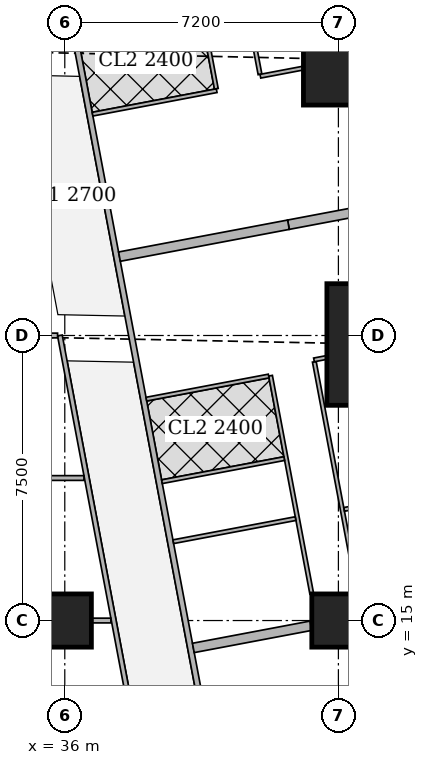
"""IFC4 building model, lengths in metres.
Left out: names, types, materials, properties, quantities, classifications, styles, units other than length and angle.
Written with IfcOpenShell. Run it as: python <this file> out.ifc"""

import sys

from ifc_helpers import new_model, si_unit, direction, frame, frame_2d, origin, origin_2d, place, context, subcontext, project, spatial, rectangle, extrude, element, fill, save


model = new_model("IFC4")
c1 = context("Model", 3, precision=1e-05, world=origin(), true_north=direction((0.0, 1.0)))
c2 = subcontext(c1, "Body", "Model", "MODEL_VIEW")
j1 = project(units=[si_unit("LENGTHUNIT", "METRE"), si_unit("PLANEANGLEUNIT", "RADIAN")], contexts=[c1])
p1 = place(None, origin())
s1 = spatial("IfcSite", under=j1, at=p1, CompositionType="ELEMENT")
p2 = place(p1, origin())
s2 = spatial("IfcBuilding", under=s1, at=p2, CompositionType="ELEMENT")
p3 = place(p2, frame((0.0, 0.0, 193.7)))
s3 = spatial("IfcBuildingStorey", under=s2, at=p3, CompositionType="ELEMENT", Elevation=193.7)
for number, where, z_axis, x_axis in (
    (1, (36.0, 15.0, 0.0), (0.0, 0.0, 1.0), (1.0, 0.0, 0.0)),
    (2, (43.2, 15.0, 0.0), (0.0, 0.0, 1.0), (1.0, 0.0, 0.0)),
):
    element("IfcColumn", number, at=place(p3, frame(where, z_axis=z_axis, x_axis=x_axis)), inside=s3, PredefinedType="COLUMN", context=c2, shape_type="SweptSolid", body=[
        extrude(rectangle(XDim=1.4, YDim=1.4, at=origin_2d()), origin(), (0.0, 0.0, 1.0), 3.75),
    ])
p4 = place(p3, frame((44.697, 22.263, 0.0), z_axis=(0.0, 0.0, 1.0), x_axis=(1.0, 0.0, 0.0)))
e3 = element("IfcColumn", 3, at=p4, inside=s3, PredefinedType="COLUMN", context=c2, shape_type="SweptSolid", body=[
    extrude(rectangle(XDim=3.6, YDim=3.2, at=origin_2d()), origin(), (0.0, 0.0, 1.0), 3.75),
])
p5 = place(p3, frame((43.48, 29.763, 0.0), z_axis=(0.0, 0.0, 1.0), x_axis=(1.0, 0.0, 0.0)))
e4 = element("IfcColumn", 4, at=p5, inside=s3, PredefinedType="COLUMN", context=c2, shape_type="SweptSolid", body=[
    extrude(rectangle(XDim=2.4, YDim=2.4, at=origin_2d()), origin(), (0.0, 0.0, 1.0), 3.75),
])
p6 = place(p3, frame((50.653, 2.703, 0.0), z_axis=(0.0, 0.0, 1.0), x_axis=(-0.185612026696, 0.982623109613, 0.0)))
e5 = element("IfcWall", 5, at=p6, inside=s3, PredefinedType="SOLIDWALL", context=c2, shape_type="SweptSolid", body=[
    extrude(rectangle(XDim=41.393, YDim=0.2, at=frame_2d((20.697, 0.0))), origin(), (0.0, 0.0, 1.0), 3.5),
])
p7 = place(p6, frame((1.633, 0.0, 0.9)))
e6 = element("IfcOpeningElement", 6, at=p7, cuts=e5, PredefinedType="OPENING", context=c2, shape_type="SweptSolid", body=[
    extrude(rectangle(XDim=1.8, YDim=1.5, at=frame_2d((0.9, 0.75))), frame((0.0, 0.11, 0.0), z_axis=(0.0, -1.0, 0.0), x_axis=(1.0, 0.0, 0.0)), (0.0, 0.0, 1.0), 0.22),
])
p8 = place(p6, frame((6.032, 0.0, 0.9)))
e7 = element("IfcOpeningElement", 7, at=p8, cuts=e5, PredefinedType="OPENING", context=c2, shape_type="SweptSolid", body=[
    extrude(rectangle(XDim=1.8, YDim=1.5, at=frame_2d((0.9, 0.75))), frame((0.0, 0.11, 0.0), z_axis=(0.0, -1.0, 0.0), x_axis=(1.0, 0.0, 0.0)), (0.0, 0.0, 1.0), 0.22),
])
p9 = place(p6, frame((9.848, 0.0, 0.9)))
e8 = element("IfcOpeningElement", 8, at=p9, cuts=e5, PredefinedType="OPENING", context=c2, shape_type="SweptSolid", body=[
    extrude(rectangle(XDim=1.8, YDim=1.5, at=frame_2d((0.9, 0.75))), frame((0.0, 0.11, 0.0), z_axis=(0.0, -1.0, 0.0), x_axis=(1.0, 0.0, 0.0)), (0.0, 0.0, 1.0), 0.22),
])
p10 = place(p6, frame((13.664, 0.0, 0.9)))
e9 = element("IfcOpeningElement", 9, at=p10, cuts=e5, PredefinedType="OPENING", context=c2, shape_type="SweptSolid", body=[
    extrude(rectangle(XDim=1.8, YDim=1.5, at=frame_2d((0.9, 0.75))), frame((0.0, 0.11, 0.0), z_axis=(0.0, -1.0, 0.0), x_axis=(1.0, 0.0, 0.0)), (0.0, 0.0, 1.0), 0.22),
])
p11 = place(p6, frame((17.481, 0.0, 0.9)))
e10 = element("IfcOpeningElement", 10, at=p11, cuts=e5, PredefinedType="OPENING", context=c2, shape_type="SweptSolid", body=[
    extrude(rectangle(XDim=1.8, YDim=1.5, at=frame_2d((0.9, 0.75))), frame((0.0, 0.11, 0.0), z_axis=(0.0, -1.0, 0.0), x_axis=(1.0, 0.0, 0.0)), (0.0, 0.0, 1.0), 0.22),
])
p12 = place(p6, frame((21.297, 0.0, 0.9)))
e11 = element("IfcOpeningElement", 11, at=p12, cuts=e5, PredefinedType="OPENING", context=c2, shape_type="SweptSolid", body=[
    extrude(rectangle(XDim=1.8, YDim=1.5, at=frame_2d((0.9, 0.75))), frame((0.0, 0.11, 0.0), z_axis=(0.0, -1.0, 0.0), x_axis=(1.0, 0.0, 0.0)), (0.0, 0.0, 1.0), 0.22),
])
p13 = place(p6, frame((25.113, 0.0, 0.9)))
e12 = element("IfcOpeningElement", 12, at=p13, cuts=e5, PredefinedType="OPENING", context=c2, shape_type="SweptSolid", body=[
    extrude(rectangle(XDim=1.8, YDim=1.5, at=frame_2d((0.9, 0.75))), frame((0.0, 0.11, 0.0), z_axis=(0.0, -1.0, 0.0), x_axis=(1.0, 0.0, 0.0)), (0.0, 0.0, 1.0), 0.22),
])
p14 = place(p6, frame((28.93, 0.0, 0.9)))
e13 = element("IfcOpeningElement", 13, at=p14, cuts=e5, PredefinedType="OPENING", context=c2, shape_type="SweptSolid", body=[
    extrude(rectangle(XDim=1.8, YDim=1.5, at=frame_2d((0.9, 0.75))), frame((0.0, 0.11, 0.0), z_axis=(0.0, -1.0, 0.0), x_axis=(1.0, 0.0, 0.0)), (0.0, 0.0, 1.0), 0.22),
])
p15 = place(p6, frame((32.746, 0.0, 0.9)))
e14 = element("IfcOpeningElement", 14, at=p15, cuts=e5, PredefinedType="OPENING", context=c2, shape_type="SweptSolid", body=[
    extrude(rectangle(XDim=1.8, YDim=1.5, at=frame_2d((0.9, 0.75))), frame((0.0, 0.11, 0.0), z_axis=(0.0, -1.0, 0.0), x_axis=(1.0, 0.0, 0.0)), (0.0, 0.0, 1.0), 0.22),
])
p16 = place(p6, frame((36.481, 0.0, 0.9)))
e15 = element("IfcOpeningElement", 15, at=p16, cuts=e5, PredefinedType="OPENING", context=c2, shape_type="SweptSolid", body=[
    extrude(rectangle(XDim=1.8, YDim=1.5, at=frame_2d((0.9, 0.75))), frame((0.0, 0.11, 0.0), z_axis=(0.0, -1.0, 0.0), x_axis=(1.0, 0.0, 0.0)), (0.0, 0.0, 1.0), 0.22),
])
p17 = place(p3, frame((33.933, 42.73, 0.0), z_axis=(0.0, 0.0, 1.0), x_axis=(0.185595417643, -0.982626246825, 0.0)))
e16 = element("IfcWall", 16, at=p17, inside=s3, PredefinedType="SOLIDWALL", context=c2, shape_type="SweptSolid", body=[
    extrude(rectangle(XDim=41.051, YDim=0.15, at=frame_2d((20.525, 0.0))), origin(), (0.0, 0.0, 1.0), 2.5),
])
p18 = place(p17, frame((16.082, 0.0, 0.0)))
e17 = element("IfcOpeningElement", 17, at=p18, cuts=e16, PredefinedType="OPENING", context=c2, shape_type="SweptSolid", body=[
    extrude(rectangle(XDim=1.0, YDim=2.1, at=frame_2d((0.5, 1.05))), frame((0.0, 0.085, 0.0), z_axis=(0.0, -1.0, 0.0), x_axis=(1.0, 0.0, 0.0)), (0.0, 0.0, 1.0), 0.17),
])
p19 = place(p17, frame((19.898, 0.0, 0.0)))
e18 = element("IfcOpeningElement", 18, at=p19, cuts=e16, PredefinedType="OPENING", context=c2, shape_type="SweptSolid", body=[
    extrude(rectangle(XDim=1.0, YDim=2.1, at=frame_2d((0.5, 1.05))), frame((0.0, 0.085, 0.0), z_axis=(0.0, -1.0, 0.0), x_axis=(1.0, 0.0, 0.0)), (0.0, 0.0, 1.0), 0.17),
])
p20 = place(p17, frame((30.862, 0.0, 0.0)))
e19 = element("IfcOpeningElement", 19, at=p20, cuts=e16, PredefinedType="OPENING", context=c2, shape_type="SweptSolid", body=[
    extrude(rectangle(XDim=1.0, YDim=2.1, at=frame_2d((0.5, 1.05))), frame((0.0, 0.085, 0.0), z_axis=(0.0, -1.0, 0.0), x_axis=(1.0, 0.0, 0.0)), (0.0, 0.0, 1.0), 0.17),
])
p21 = place(p3, frame((38.764, 41.941, 0.0), z_axis=(0.0, 0.0, 1.0), x_axis=(0.185512176227, -0.982641965556, 0.0)))
e20 = element("IfcWall", 20, at=p21, inside=s3, PredefinedType="PARTITIONING", context=c2, shape_type="SweptSolid", body=[
    extrude(rectangle(XDim=12.792, YDim=0.1, at=frame_2d((6.396, 0.0))), origin(), (0.0, 0.0, 1.0), 2.5),
])
p22 = place(p21, frame((11.35, 0.0, 0.0)))
e21 = element("IfcOpeningElement", 21, at=p22, cuts=e20, PredefinedType="OPENING", context=c2, shape_type="SweptSolid", body=[
    extrude(rectangle(XDim=0.9, YDim=2.1, at=frame_2d((0.45, 1.05))), frame((0.0, 0.06, 0.0), z_axis=(0.0, -1.0, 0.0), x_axis=(1.0, 0.0, 0.0)), (0.0, 0.0, 1.0), 0.12),
])
p23 = place(p21, frame((8.085, 0.0, 0.0)))
e22 = element("IfcOpeningElement", 22, at=p23, cuts=e20, PredefinedType="OPENING", context=c2, shape_type="SweptSolid", body=[
    extrude(rectangle(XDim=0.9, YDim=2.1, at=frame_2d((0.45, 1.05))), frame((0.0, 0.06, 0.0), z_axis=(0.0, -1.0, 0.0), x_axis=(1.0, 0.0, 0.0)), (0.0, 0.0, 1.0), 0.12),
])
p24 = place(p21, frame((3.7, 0.0, 0.0)))
e23 = element("IfcOpeningElement", 23, at=p24, cuts=e20, PredefinedType="OPENING", context=c2, shape_type="SweptSolid", body=[
    extrude(rectangle(XDim=0.9, YDim=2.1, at=frame_2d((0.45, 1.05))), frame((0.0, 0.06, 0.0), z_axis=(0.0, -1.0, 0.0), x_axis=(1.0, 0.0, 0.0)), (0.0, 0.0, 1.0), 0.12),
])
p25 = place(p3, frame((37.473, 42.309, 0.0), z_axis=(0.0, 0.0, 1.0), x_axis=(0.185570636839, -0.982630927024, 0.0)))
e24 = element("IfcWall", 24, at=p25, inside=s3, PredefinedType="PARTITIONING", context=c2, shape_type="SweptSolid", body=[
    extrude(rectangle(XDim=13.553, YDim=0.1, at=frame_2d((6.777, 0.0))), origin(), (0.0, 0.0, 1.0), 2.5),
])
p26 = place(p25, frame((12.049, 0.0, 0.0)))
e25 = element("IfcOpeningElement", 25, at=p26, cuts=e24, PredefinedType="OPENING", context=c2, shape_type="SweptSolid", body=[
    extrude(rectangle(XDim=0.9, YDim=2.1, at=frame_2d((0.45, 1.05))), frame((0.0, 0.06, 0.0), z_axis=(0.0, -1.0, 0.0), x_axis=(1.0, 0.0, 0.0)), (0.0, 0.0, 1.0), 0.12),
])
p27 = place(p25, frame((8.427, 0.0, 0.0)))
e26 = element("IfcOpeningElement", 26, at=p27, cuts=e24, PredefinedType="OPENING", context=c2, shape_type="SweptSolid", body=[
    extrude(rectangle(XDim=0.9, YDim=2.1, at=frame_2d((0.45, 1.05))), frame((0.0, 0.06, 0.0), z_axis=(0.0, -1.0, 0.0), x_axis=(1.0, 0.0, 0.0)), (0.0, 0.0, 1.0), 0.12),
])
p28 = place(p25, frame((2.853, 0.0, 0.0)))
e27 = element("IfcOpeningElement", 27, at=p28, cuts=e24, PredefinedType="OPENING", context=c2, shape_type="SweptSolid", body=[
    extrude(rectangle(XDim=0.9, YDim=2.1, at=frame_2d((0.45, 1.05))), frame((0.0, 0.06, 0.0), z_axis=(0.0, -1.0, 0.0), x_axis=(1.0, 0.0, 0.0)), (0.0, 0.0, 1.0), 0.12),
])
p29 = place(p25, frame((10.14, 0.0, 0.0)))
e28 = element("IfcOpeningElement", 28, at=p29, cuts=e24, PredefinedType="OPENING", context=c2, shape_type="SweptSolid", body=[
    extrude(rectangle(XDim=0.9, YDim=2.1, at=frame_2d((0.45, 1.05))), frame((0.0, 0.06, 0.0), z_axis=(0.0, -1.0, 0.0), x_axis=(1.0, 0.0, 0.0)), (0.0, 0.0, 1.0), 0.12),
])
p30 = place(p25, frame((5.759, 0.0, 0.0)))
e29 = element("IfcOpeningElement", 29, at=p30, cuts=e24, PredefinedType="OPENING", context=c2, shape_type="SweptSolid", body=[
    extrude(rectangle(XDim=0.9, YDim=2.1, at=frame_2d((0.45, 1.05))), frame((0.0, 0.06, 0.0), z_axis=(0.0, -1.0, 0.0), x_axis=(1.0, 0.0, 0.0)), (0.0, 0.0, 1.0), 0.12),
])
p31 = place(p3, frame((42.27, 29.535, 0.0), z_axis=(0.0, 0.0, 1.0), x_axis=(-0.982502700549, -0.186248338017, 0.0)))
e30 = element("IfcWall", 30, at=p31, inside=s3, PredefinedType="PARTITIONING", context=c2, shape_type="SweptSolid", body=[
    extrude(rectangle(XDim=1.143, YDim=0.1, at=frame_2d((0.572, 0.0))), origin(), (0.0, 0.0, 1.0), 2.5),
])
p32 = place(p3, frame((39.997, 28.942, 0.0), z_axis=(0.0, 0.0, 1.0), x_axis=(-0.982569883123, -0.185893584556, 0.0)))
e31 = element("IfcWall", 31, at=p32, inside=s3, PredefinedType="PARTITIONING", context=c2, shape_type="SweptSolid", body=[
    extrude(rectangle(XDim=3.324, YDim=0.1, at=frame_2d((1.662, 0.0))), origin(), (0.0, 0.0, 1.0), 3.5),
])
p33 = place(p3, frame((42.566, 21.809, 0.0), z_axis=(0.0, 0.0, 1.0), x_axis=(0.185613526435, -0.98262282632, 0.0)))
e32 = element("IfcWall", 32, at=p33, inside=s3, PredefinedType="PARTITIONING", context=c2, shape_type="SweptSolid", body=[
    extrude(rectangle(XDim=6.207, YDim=0.1, at=frame_2d((3.104, 0.0))), origin(), (0.0, 0.0, 1.0), 2.5),
])
p34 = place(p33, frame((1.45, 0.0, 0.0)))
e33 = element("IfcOpeningElement", 33, at=p34, cuts=e32, PredefinedType="OPENING", context=c2, shape_type="SweptSolid", body=[
    extrude(rectangle(XDim=0.9, YDim=2.1, at=frame_2d((0.45, 1.05))), frame((0.0, 0.06, 0.0), z_axis=(0.0, -1.0, 0.0), x_axis=(1.0, 0.0, 0.0)), (0.0, 0.0, 1.0), 0.12),
])
p35 = place(p33, frame((4.163, 0.0, 0.0)))
e34 = element("IfcOpeningElement", 34, at=p35, cuts=e32, PredefinedType="OPENING", context=c2, shape_type="SweptSolid", body=[
    extrude(rectangle(XDim=0.9, YDim=2.1, at=frame_2d((0.45, 1.05))), frame((0.0, 0.06, 0.0), z_axis=(0.0, -1.0, 0.0), x_axis=(1.0, 0.0, 0.0)), (0.0, 0.0, 1.0), 0.12),
])
p36 = place(p3, frame((41.414, 21.442, 0.0), z_axis=(0.0, 0.0, 1.0), x_axis=(0.185698675093, -0.982606738257, 0.0)))
e35 = element("IfcWall", 35, at=p36, inside=s3, PredefinedType="PARTITIONING", context=c2, shape_type="SweptSolid", body=[
    extrude(rectangle(XDim=5.843, YDim=0.1, at=frame_2d((2.921, 0.0))), origin(), (0.0, 0.0, 1.0), 3.5),
])
p37 = place(p36, frame((0.655, 0.0, 0.0)))
e36 = element("IfcOpeningElement", 36, at=p37, cuts=e35, PredefinedType="OPENING", context=c2, shape_type="SweptSolid", body=[
    extrude(rectangle(XDim=0.9, YDim=2.1, at=frame_2d((0.45, 1.05))), frame((0.0, 0.06, 0.0), z_axis=(0.0, -1.0, 0.0), x_axis=(1.0, 0.0, 0.0)), (0.0, 0.0, 1.0), 0.12),
])
p38 = place(p36, frame((2.563, 0.0, 0.0)))
e37 = element("IfcOpeningElement", 37, at=p38, cuts=e35, PredefinedType="OPENING", context=c2, shape_type="SweptSolid", body=[
    extrude(rectangle(XDim=0.9, YDim=2.1, at=frame_2d((0.45, 1.05))), frame((0.0, 0.06, 0.0), z_axis=(0.0, -1.0, 0.0), x_axis=(1.0, 0.0, 0.0)), (0.0, 0.0, 1.0), 0.12),
])
p39 = place(p3, frame((42.887, 21.921, 0.0), z_axis=(0.0, 0.0, 1.0), x_axis=(-0.982274918032, -0.187445953293, 0.0)))
e38 = element("IfcWall", 38, at=p39, inside=s3, PredefinedType="PARTITIONING", context=c2, shape_type="SweptSolid", body=[
    extrude(rectangle(XDim=0.336, YDim=0.1, at=frame_2d((0.168, 0.0))), origin(), (0.0, 0.0, 1.0), 2.5),
])
p40 = place(p3, frame((47.527, 18.712, 0.0), z_axis=(0.0, 0.0, 1.0), x_axis=(-0.982665405803, -0.185387972203, 0.0)))
e39 = element("IfcWall", 39, at=p40, inside=s3, PredefinedType="PARTITIONING", context=c2, shape_type="SweptSolid", body=[
    extrude(rectangle(XDim=4.25, YDim=0.1, at=frame_2d((2.125, 0.0))), origin(), (0.0, 0.0, 1.0), 2.05),
])
p41 = place(p3, frame((41.365, 21.433, 0.0), z_axis=(0.0, 0.0, 1.0), x_axis=(-0.982607026909, -0.185697147715, 0.0)))
e40 = element("IfcWall", 40, at=p41, inside=s3, PredefinedType="PARTITIONING", context=c2, shape_type="SweptSolid", body=[
    extrude(rectangle(XDim=3.275, YDim=0.1, at=frame_2d((1.637, 0.0))), origin(), (0.0, 0.0, 1.0), 3.5),
])
p42 = place(p3, frame((42.073, 17.682, 0.0), z_axis=(0.0, 0.0, 1.0), x_axis=(-0.982620626894, -0.185625169636, 0.0)))
e41 = element("IfcWall", 41, at=p42, inside=s3, PredefinedType="PARTITIONING", context=c2, shape_type="SweptSolid", body=[
    extrude(rectangle(XDim=3.275, YDim=0.1, at=frame_2d((1.637, 0.0))), origin(), (0.0, 0.0, 1.0), 3.5),
])
p43 = place(p42, frame((1.2, 0.0, 0.0)))
e42 = element("IfcOpeningElement", 42, at=p43, cuts=e41, PredefinedType="OPENING", context=c2, shape_type="SweptSolid", body=[
    extrude(rectangle(XDim=0.9, YDim=2.1, at=frame_2d((0.45, 1.05))), frame((0.0, 0.06, 0.0), z_axis=(0.0, -1.0, 0.0), x_axis=(1.0, 0.0, 0.0)), (0.0, 0.0, 1.0), 0.12),
])
p44 = place(p3, frame((41.775, 19.261, 0.0), z_axis=(0.0, 0.0, 1.0), x_axis=(-0.982620626894, -0.185625169636, 0.0)))
e43 = element("IfcWall", 43, at=p44, inside=s3, PredefinedType="PARTITIONING", context=c2, shape_type="SweptSolid", body=[
    extrude(rectangle(XDim=3.275, YDim=0.1, at=frame_2d((1.637, 0.0))), origin(), (0.0, 0.0, 1.0), 3.5),
])
p45 = place(p3, frame((46.11, 26.213, 0.0), z_axis=(0.0, 0.0, 1.0), x_axis=(-0.982633535512, -0.185556823879, 0.0)))
e44 = element("IfcWall", 44, at=p45, inside=s3, PredefinedType="SOLIDWALL", context=c2, shape_type="SweptSolid", body=[
    extrude(rectangle(XDim=4.3, YDim=0.25, at=frame_2d((2.15, 0.0))), origin(), (0.0, 0.0, 1.0), 2.05),
])
p46 = place(p3, frame((41.885, 25.415, 0.0), z_axis=(0.0, 0.0, 1.0), x_axis=(-0.982612837616, -0.185666398014, 0.0)))
e45 = element("IfcWall", 45, at=p46, inside=s3, PredefinedType="SOLIDWALL", context=c2, shape_type="SweptSolid", body=[
    extrude(rectangle(XDim=4.525, YDim=0.25, at=frame_2d((2.262, 0.0))), origin(), (0.0, 0.0, 1.0), 3.5),
])
p47 = place(p3, frame((42.476, 14.863, 0.0), z_axis=(0.0, 0.0, 1.0), x_axis=(-0.982638716117, -0.185529387398, 0.0)))
e46 = element("IfcWall", 46, at=p47, inside=s3, PredefinedType="SOLIDWALL", context=c2, shape_type="SweptSolid", body=[
    extrude(rectangle(XDim=3.148, YDim=0.25, at=frame_2d((1.574, 0.0))), origin(), (0.0, 0.0, 1.0), 3.5),
])
p48 = place(p3, frame((38.202, 10.163, 0.0), z_axis=(0.0, 0.0, 1.0), x_axis=(-0.185645577403, 0.982616771479, 0.0)))
e47 = element("IfcWall", 47, at=p48, inside=s3, PredefinedType="PARTITIONING", context=c2, shape_type="SweptSolid", body=[
    extrude(rectangle(XDim=12.555, YDim=0.125, at=frame_2d((6.278, 0.0))), origin(), (0.0, 0.0, 1.0), 2.5),
])
p49 = place(p48, frame((0.708, 0.0, 0.0)))
e48 = element("IfcOpeningElement", 48, at=p49, cuts=e47, PredefinedType="OPENING", context=c2, shape_type="SweptSolid", body=[
    extrude(rectangle(XDim=1.0, YDim=2.1, at=frame_2d((0.5, 1.05))), frame((0.0, 0.073, 0.0), z_axis=(0.0, -1.0, 0.0), x_axis=(1.0, 0.0, 0.0)), (0.0, 0.0, 1.0), 0.145),
])
p50 = place(p48, frame((5.9, 0.0, 0.0)))
e49 = element("IfcOpeningElement", 49, at=p50, cuts=e47, PredefinedType="OPENING", context=c2, shape_type="SweptSolid", body=[
    extrude(rectangle(XDim=1.0, YDim=2.1, at=frame_2d((0.5, 1.05))), frame((0.0, 0.073, 0.0), z_axis=(0.0, -1.0, 0.0), x_axis=(1.0, 0.0, 0.0)), (0.0, 0.0, 1.0), 0.145),
])
p51 = place(p48, frame((9.562, 0.0, 0.0)))
e50 = element("IfcOpeningElement", 50, at=p51, cuts=e47, PredefinedType="OPENING", context=c2, shape_type="SweptSolid", body=[
    extrude(rectangle(XDim=1.0, YDim=2.1, at=frame_2d((0.5, 1.05))), frame((0.0, 0.073, 0.0), z_axis=(0.0, -1.0, 0.0), x_axis=(1.0, 0.0, 0.0)), (0.0, 0.0, 1.0), 0.145),
])
p52 = place(p3, frame((36.701, 15.0, 0.0), z_axis=(0.0, 0.0, 1.0), x_axis=(1.0, 0.0, 0.0)))
e51 = element("IfcWall", 51, at=p52, inside=s3, PredefinedType="PARTITIONING", context=c2, shape_type="SweptSolid", body=[
    extrude(rectangle(XDim=0.512, YDim=0.125, at=frame_2d((0.256, 0.0))), origin(), (0.0, 0.0, 1.0), 3.5),
])
p53 = place(p3, frame((29.25, 18.75, 0.0), z_axis=(0.0, 0.0, 1.0), x_axis=(1.0, 0.0, 0.0)))
e52 = element("IfcWall", 52, at=p53, inside=s3, PredefinedType="PARTITIONING", context=c2, shape_type="SweptSolid", body=[
    extrude(rectangle(XDim=7.254, YDim=0.125, at=frame_2d((3.627, 0.0))), origin(), (0.0, 0.0, 1.0), 3.5),
])
p54 = place(p3, frame((33.701, 22.5, 0.0), z_axis=(0.0, 0.0, 1.0), x_axis=(1.0, 0.0, 0.0)))
e53 = element("IfcWall", 53, at=p54, inside=s3, PredefinedType="PARTITIONING", context=c2, shape_type="SweptSolid", body=[
    extrude(rectangle(XDim=2.109, YDim=0.125, at=frame_2d((1.055, 0.0))), origin(), (0.0, 0.0, 1.0), 2.5),
])
p55 = place(p22, origin())
e54 = element("IfcDoor", 54, at=p55, inside=s3, OperationType="SINGLE_SWING_RIGHT", PredefinedType="DOOR", context=c2, shape_type="SweptSolid", body=[
    extrude(rectangle(XDim=0.9, YDim=2.1, at=frame_2d((0.45, 1.05))), frame((0.0, 0.025, 0.0), z_axis=(0.0, -1.0, 0.0), x_axis=(1.0, 0.0, 0.0)), (0.0, 0.0, 1.0), 0.05),
])
fill(e21, e54)
p56 = place(p26, origin())
e55 = element("IfcDoor", 55, at=p56, inside=s3, OperationType="SINGLE_SWING_LEFT", PredefinedType="DOOR", context=c2, shape_type="SweptSolid", body=[
    extrude(rectangle(XDim=0.9, YDim=2.1, at=frame_2d((0.45, 1.05))), frame((0.0, 0.025, 0.0), z_axis=(0.0, -1.0, 0.0), x_axis=(1.0, 0.0, 0.0)), (0.0, 0.0, 1.0), 0.05),
])
fill(e25, e55)
p57 = place(p18, origin())
e56 = element("IfcDoor", 56, at=p57, inside=s3, OperationType="SINGLE_SWING_LEFT", PredefinedType="DOOR", context=c2, shape_type="SweptSolid", body=[
    extrude(rectangle(XDim=1.0, YDim=2.1, at=frame_2d((0.5, 1.05))), frame((0.0, 0.025, 0.0), z_axis=(0.0, -1.0, 0.0), x_axis=(1.0, 0.0, 0.0)), (0.0, 0.0, 1.0), 0.05),
])
fill(e17, e56)
p58 = place(p34, origin())
e57 = element("IfcDoor", 57, at=p58, inside=s3, OperationType="SINGLE_SWING_LEFT", PredefinedType="DOOR", context=c2, shape_type="SweptSolid", body=[
    extrude(rectangle(XDim=0.9, YDim=2.1, at=frame_2d((0.45, 1.05))), frame((0.0, 0.025, 0.0), z_axis=(0.0, -1.0, 0.0), x_axis=(1.0, 0.0, 0.0)), (0.0, 0.0, 1.0), 0.05),
])
fill(e33, e57)
p59 = place(p35, origin())
e58 = element("IfcDoor", 58, at=p59, inside=s3, OperationType="SINGLE_SWING_LEFT", PredefinedType="DOOR", context=c2, shape_type="SweptSolid", body=[
    extrude(rectangle(XDim=0.9, YDim=2.1, at=frame_2d((0.45, 1.05))), frame((0.0, 0.025, 0.0), z_axis=(0.0, -1.0, 0.0), x_axis=(1.0, 0.0, 0.0)), (0.0, 0.0, 1.0), 0.05),
])
fill(e34, e58)
p60 = place(p37, origin())
e59 = element("IfcDoor", 59, at=p60, inside=s3, OperationType="SINGLE_SWING_RIGHT", PredefinedType="DOOR", context=c2, shape_type="SweptSolid", body=[
    extrude(rectangle(XDim=0.9, YDim=2.1, at=frame_2d((0.45, 1.05))), frame((0.0, 0.025, 0.0), z_axis=(0.0, -1.0, 0.0), x_axis=(1.0, 0.0, 0.0)), (0.0, 0.0, 1.0), 0.05),
])
fill(e36, e59)
p61 = place(p38, origin())
e60 = element("IfcDoor", 60, at=p61, inside=s3, OperationType="SINGLE_SWING_LEFT", PredefinedType="DOOR", context=c2, shape_type="SweptSolid", body=[
    extrude(rectangle(XDim=0.9, YDim=2.1, at=frame_2d((0.45, 1.05))), frame((0.0, 0.025, 0.0), z_axis=(0.0, -1.0, 0.0), x_axis=(1.0, 0.0, 0.0)), (0.0, 0.0, 1.0), 0.05),
])
fill(e37, e60)
p62 = place(p19, origin())
e61 = element("IfcDoor", 61, at=p62, inside=s3, OperationType="SINGLE_SWING_RIGHT", PredefinedType="DOOR", context=c2, shape_type="SweptSolid", body=[
    extrude(rectangle(XDim=1.0, YDim=2.1, at=frame_2d((0.5, 1.05))), frame((0.0, 0.025, 0.0), z_axis=(0.0, -1.0, 0.0), x_axis=(1.0, 0.0, 0.0)), (0.0, 0.0, 1.0), 0.05),
])
fill(e18, e61)
p63 = place(p43, origin())
e62 = element("IfcDoor", 62, at=p63, inside=s3, OperationType="SINGLE_SWING_LEFT", PredefinedType="DOOR", context=c2, shape_type="SweptSolid", body=[
    extrude(rectangle(XDim=0.9, YDim=2.1, at=frame_2d((0.45, 1.05))), frame((0.0, 0.025, 0.0), z_axis=(0.0, -1.0, 0.0), x_axis=(1.0, 0.0, 0.0)), (0.0, 0.0, 1.0), 0.05),
])
fill(e42, e62)
p64 = place(p50, origin())
e63 = element("IfcDoor", 63, at=p64, inside=s3, OperationType="SINGLE_SWING_LEFT", PredefinedType="DOOR", context=c2, shape_type="SweptSolid", body=[
    extrude(rectangle(XDim=1.0, YDim=2.1, at=frame_2d((0.5, 1.05))), frame((0.0, 0.025, 0.0), z_axis=(0.0, -1.0, 0.0), x_axis=(1.0, 0.0, 0.0)), (0.0, 0.0, 1.0), 0.05),
])
fill(e49, e63)
p65 = place(p51, origin())
e64 = element("IfcDoor", 64, at=p65, inside=s3, OperationType="SINGLE_SWING_LEFT", PredefinedType="DOOR", context=c2, shape_type="SweptSolid", body=[
    extrude(rectangle(XDim=1.0, YDim=2.1, at=frame_2d((0.5, 1.05))), frame((0.0, 0.025, 0.0), z_axis=(0.0, -1.0, 0.0), x_axis=(1.0, 0.0, 0.0)), (0.0, 0.0, 1.0), 0.05),
])
fill(e50, e64)
save(model, sys.argv[1])
